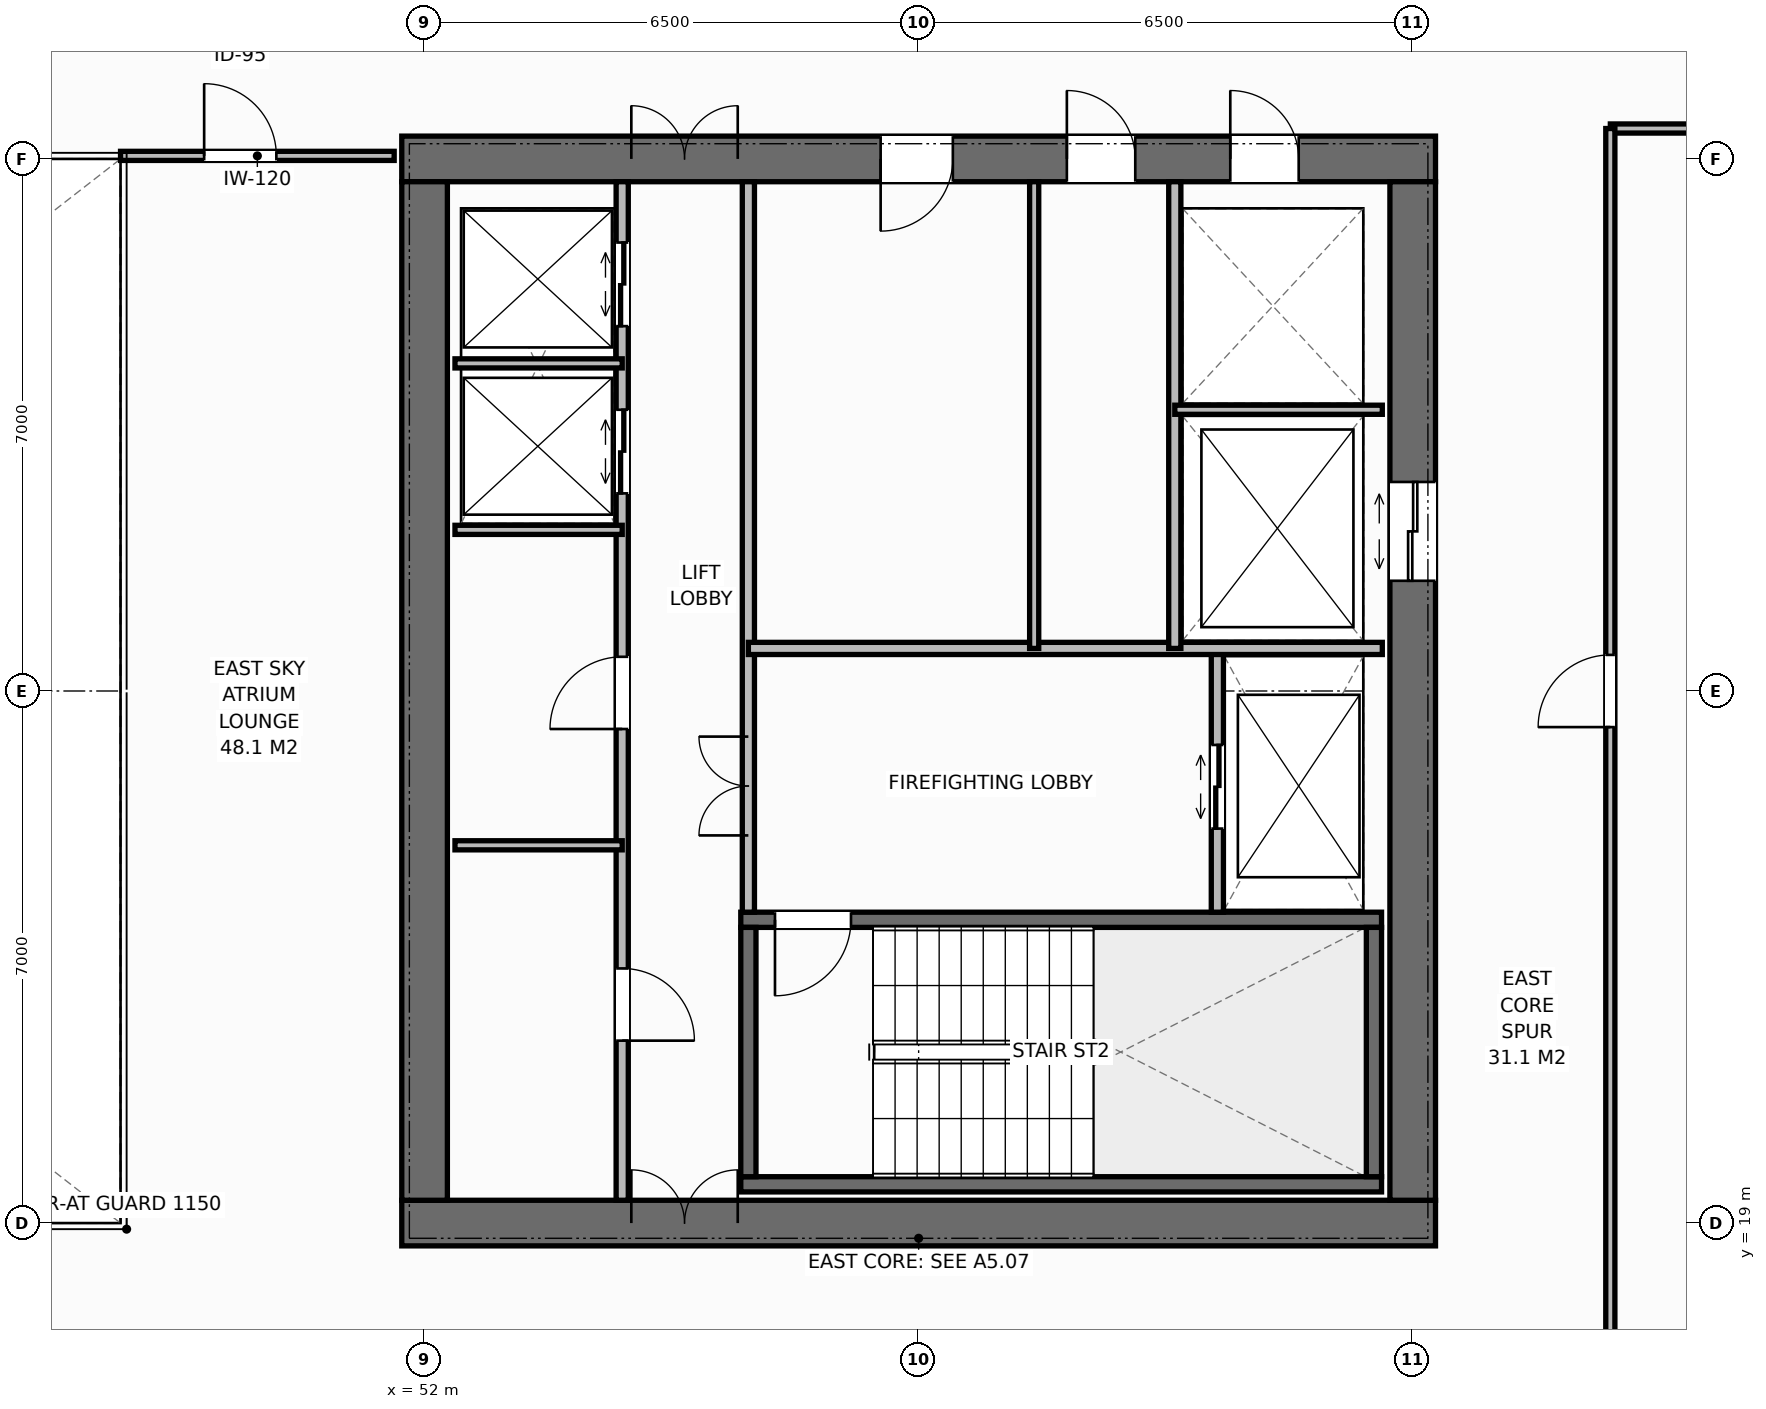
"""IFC4 building model, lengths in metres.
Left out: names, types, materials, properties, quantities, classifications, styles, units other than length and angle.
Written with IfcOpenShell. Run it as: python <this file> out.ifc"""

import sys

from ifc_helpers import new_model, si_unit, direction, frame, frame_2d, origin, place, context, subcontext, project, spatial, rectangle, extrude, element, fill, save


model = new_model("IFC4")
c1 = context("Model", 3, precision=1e-05, world=origin(), true_north=direction((0.0, 1.0)))
c2 = subcontext(c1, "Body", "Model", "MODEL_VIEW")
j1 = project(units=[si_unit("LENGTHUNIT", "METRE"), si_unit("PLANEANGLEUNIT", "RADIAN")], contexts=[c1])
p1 = place(None, origin())
s1 = spatial("IfcSite", under=j1, at=p1, CompositionType="ELEMENT")
p2 = place(p1, origin())
s2 = spatial("IfcBuilding", under=s1, at=p2, CompositionType="ELEMENT")
p3 = place(p2, frame((0.0, 0.0, 186.0)))
s3 = spatial("IfcBuildingStorey", under=s2, at=p3, CompositionType="ELEMENT", Elevation=186.0)
p4 = place(p3, frame((51.7, 19.0, 0.0), z_axis=(0.0, 0.0, 1.0), x_axis=(1.0, 0.0, 0.0)))
e1 = element("IfcWall", 1, at=p4, inside=s3, PredefinedType="SHEAR", context=c2, shape_type="SweptSolid", body=[
    extrude(rectangle(XDim=13.6, YDim=0.6, at=frame_2d((6.8, 0.0))), origin(), (0.0, 0.0, 1.0), 3.8),
])
p5 = place(p4, frame((3.02, 0.0, 0.0)))
e2 = element("IfcOpeningElement", 2, at=p5, cuts=e1, PredefinedType="OPENING", context=c2, shape_type="SweptSolid", body=[
    extrude(rectangle(XDim=1.4, YDim=2.2, at=frame_2d((0.7, 1.1))), frame((0.0, 0.31, 0.0), z_axis=(0.0, -1.0, 0.0), x_axis=(1.0, 0.0, 0.0)), (0.0, 0.0, 1.0), 0.62),
])
p6 = place(p3, frame((51.7, 33.0, 0.0), z_axis=(0.0, 0.0, 1.0), x_axis=(1.0, 0.0, 0.0)))
e3 = element("IfcWall", 3, at=p6, inside=s3, PredefinedType="SHEAR", context=c2, shape_type="SweptSolid", body=[
    extrude(rectangle(XDim=13.6, YDim=0.6, at=frame_2d((6.8, 0.0))), origin(), (0.0, 0.0, 1.0), 3.8),
])
p7 = place(p6, frame((3.02, 0.0, 0.0)))
e4 = element("IfcOpeningElement", 4, at=p7, cuts=e3, PredefinedType="OPENING", context=c2, shape_type="SweptSolid", body=[
    extrude(rectangle(XDim=1.4, YDim=2.2, at=frame_2d((0.7, 1.1))), frame((0.0, 0.31, 0.0), z_axis=(0.0, -1.0, 0.0), x_axis=(1.0, 0.0, 0.0)), (0.0, 0.0, 1.0), 0.62),
])
p8 = place(p6, frame((10.9, 0.0, 0.0)))
e5 = element("IfcOpeningElement", 5, at=p8, cuts=e3, PredefinedType="OPENING", context=c2, shape_type="SweptSolid", body=[
    extrude(rectangle(XDim=0.9, YDim=2.15, at=frame_2d((0.45, 1.075))), frame((0.0, 0.31, 0.0), z_axis=(0.0, -1.0, 0.0), x_axis=(1.0, 0.0, 0.0)), (0.0, 0.0, 1.0), 0.62),
])
p9 = place(p6, frame((6.3, 0.0, 0.0)))
e6 = element("IfcOpeningElement", 6, at=p9, cuts=e3, PredefinedType="OPENING", context=c2, shape_type="SweptSolid", body=[
    extrude(rectangle(XDim=0.95, YDim=2.15, at=frame_2d((0.475, 1.075))), frame((0.0, 0.31, 0.0), z_axis=(0.0, -1.0, 0.0), x_axis=(1.0, 0.0, 0.0)), (0.0, 0.0, 1.0), 0.62),
])
p10 = place(p6, frame((8.75, 0.0, 0.0)))
e7 = element("IfcOpeningElement", 7, at=p10, cuts=e3, PredefinedType="OPENING", context=c2, shape_type="SweptSolid", body=[
    extrude(rectangle(XDim=0.9, YDim=2.15, at=frame_2d((0.45, 1.075))), frame((0.0, 0.31, 0.0), z_axis=(0.0, -1.0, 0.0), x_axis=(1.0, 0.0, 0.0)), (0.0, 0.0, 1.0), 0.62),
])
p11 = place(p3, frame((52.0, 19.3, 0.0), z_axis=(0.0, 0.0, 1.0), x_axis=(0.0, 1.0, 0.0)))
e8 = element("IfcWall", 8, at=p11, inside=s3, PredefinedType="SHEAR", context=c2, shape_type="SweptSolid", body=[
    extrude(rectangle(XDim=13.4, YDim=0.6, at=frame_2d((6.7, 0.0))), origin(), (0.0, 0.0, 1.0), 3.8),
])
p12 = place(p3, frame((65.0, 19.3, 0.0), z_axis=(0.0, 0.0, 1.0), x_axis=(0.0, 1.0, 0.0)))
e9 = element("IfcWall", 9, at=p12, inside=s3, PredefinedType="SHEAR", context=c2, shape_type="SweptSolid", body=[
    extrude(rectangle(XDim=13.4, YDim=0.6, at=frame_2d((6.7, 0.0))), origin(), (0.0, 0.0, 1.0), 3.8),
])
p13 = place(p12, frame((8.15, 0.0, 0.0)))
e10 = element("IfcOpeningElement", 10, at=p13, cuts=e9, PredefinedType="OPENING", context=c2, shape_type="SweptSolid", body=[
    extrude(rectangle(XDim=1.3, YDim=2.2, at=frame_2d((0.65, 1.1))), frame((0.0, 0.31, 0.0), z_axis=(0.0, -1.0, 0.0), x_axis=(1.0, 0.0, 0.0)), (0.0, 0.0, 1.0), 0.62),
])
p14 = place(p3, frame((56.16, 19.51, 0.0), z_axis=(0.0, 0.0, 1.0), x_axis=(1.0, 0.0, 0.0)))
e11 = element("IfcWall", 11, at=p14, inside=s3, PredefinedType="SHEAR", context=c2, shape_type="SweptSolid", body=[
    extrude(rectangle(XDim=8.43, YDim=0.2, at=frame_2d((4.215, 0.0))), origin(), (0.0, 0.0, 1.0), 3.8),
])
p15 = place(p3, frame((56.16, 22.99, 0.0), z_axis=(0.0, 0.0, 1.0), x_axis=(1.0, 0.0, 0.0)))
e12 = element("IfcWall", 12, at=p15, inside=s3, PredefinedType="SHEAR", context=c2, shape_type="SweptSolid", body=[
    extrude(rectangle(XDim=8.43, YDim=0.2, at=frame_2d((4.215, 0.0))), origin(), (0.0, 0.0, 1.0), 3.8),
])
p16 = place(p15, frame((0.45, 0.0, 0.0)))
e13 = element("IfcOpeningElement", 13, at=p16, cuts=e12, PredefinedType="OPENING", context=c2, shape_type="SweptSolid", body=[
    extrude(rectangle(XDim=1.0, YDim=2.15, at=frame_2d((0.5, 1.075))), frame((0.0, 0.11, 0.0), z_axis=(0.0, -1.0, 0.0), x_axis=(1.0, 0.0, 0.0)), (0.0, 0.0, 1.0), 0.22),
])
for number, where, z_axis, x_axis in (
    (14, (56.26, 19.61, 0.0), (0.0, 0.0, 1.0), (0.0, 1.0, 0.0)),
    (15, (64.49, 19.61, 0.0), (0.0, 0.0, 1.0), (0.0, 1.0, 0.0)),
):
    element("IfcWall", number, at=place(p3, frame(where, z_axis=z_axis, x_axis=x_axis)), inside=s3, PredefinedType="SHEAR", context=c2, shape_type="SweptSolid", body=[
        extrude(rectangle(XDim=3.28, YDim=0.2, at=frame_2d((1.64, 0.0))), origin(), (0.0, 0.0, 1.0), 3.8),
    ])
p17 = place(p3, frame((54.6, 19.3, 0.0), z_axis=(0.0, 0.0, 1.0), x_axis=(0.0, 1.0, 0.0)))
e16 = element("IfcWall", 16, at=p17, inside=s3, PredefinedType="STANDARD", context=c2, shape_type="SweptSolid", body=[
    extrude(rectangle(XDim=13.4, YDim=0.16, at=frame_2d((6.7, 0.0))), origin(), (0.0, 0.0, 1.0), 3.572),
])
p18 = place(p17, frame((2.1, 0.0, 0.0)))
e17 = element("IfcOpeningElement", 17, at=p18, cuts=e16, PredefinedType="OPENING", context=c2, shape_type="SweptSolid", body=[
    extrude(rectangle(XDim=0.95, YDim=2.15, at=frame_2d((0.475, 1.075))), frame((0.0, 0.09, 0.0), z_axis=(0.0, -1.0, 0.0), x_axis=(1.0, 0.0, 0.0)), (0.0, 0.0, 1.0), 0.18),
])
p19 = place(p17, frame((6.2, 0.0, 0.0)))
e18 = element("IfcOpeningElement", 18, at=p19, cuts=e16, PredefinedType="OPENING", context=c2, shape_type="SweptSolid", body=[
    extrude(rectangle(XDim=0.95, YDim=2.15, at=frame_2d((0.475, 1.075))), frame((0.0, 0.09, 0.0), z_axis=(0.0, -1.0, 0.0), x_axis=(1.0, 0.0, 0.0)), (0.0, 0.0, 1.0), 0.18),
])
p20 = place(p17, frame((9.3, 0.0, 0.0)))
e19 = element("IfcOpeningElement", 19, at=p20, cuts=e16, PredefinedType="OPENING", context=c2, shape_type="SweptSolid", body=[
    extrude(rectangle(XDim=1.1, YDim=2.2, at=frame_2d((0.55, 1.1))), frame((0.0, 0.09, 0.0), z_axis=(0.0, -1.0, 0.0), x_axis=(1.0, 0.0, 0.0)), (0.0, 0.0, 1.0), 0.18),
])
p21 = place(p17, frame((11.5, 0.0, 0.0)))
e20 = element("IfcOpeningElement", 20, at=p21, cuts=e16, PredefinedType="OPENING", context=c2, shape_type="SweptSolid", body=[
    extrude(rectangle(XDim=1.1, YDim=2.2, at=frame_2d((0.55, 1.1))), frame((0.0, 0.09, 0.0), z_axis=(0.0, -1.0, 0.0), x_axis=(1.0, 0.0, 0.0)), (0.0, 0.0, 1.0), 0.18),
])
p22 = place(p3, frame((56.26, 23.09, 0.0), z_axis=(0.0, 0.0, 1.0), x_axis=(0.0, 1.0, 0.0)))
e21 = element("IfcWall", 21, at=p22, inside=s3, PredefinedType="STANDARD", context=c2, shape_type="SweptSolid", body=[
    extrude(rectangle(XDim=9.61, YDim=0.16, at=frame_2d((4.805, 0.0))), origin(), (0.0, 0.0, 1.0), 3.572),
])
p23 = place(p22, frame((1.01, 0.0, 0.0)))
e22 = element("IfcOpeningElement", 22, at=p23, cuts=e21, PredefinedType="OPENING", context=c2, shape_type="SweptSolid", body=[
    extrude(rectangle(XDim=1.3, YDim=2.2, at=frame_2d((0.65, 1.1))), frame((0.0, 0.09, 0.0), z_axis=(0.0, -1.0, 0.0), x_axis=(1.0, 0.0, 0.0)), (0.0, 0.0, 1.0), 0.18),
])
for number, where, z_axis, x_axis in (
    (23, (52.4, 23.97, 0.0), (0.0, 0.0, 1.0), (1.0, 0.0, 0.0)),
    (24, (52.4, 28.12, 0.0), (0.0, 0.0, 1.0), (1.0, 0.0, 0.0)),
    (25, (52.4, 30.31, 0.0), (0.0, 0.0, 1.0), (1.0, 0.0, 0.0)),
):
    element("IfcWall", number, at=place(p3, frame(where, z_axis=z_axis, x_axis=x_axis)), inside=s3, PredefinedType="PARTITIONING", context=c2, shape_type="SweptSolid", body=[
        extrude(rectangle(XDim=2.2, YDim=0.12, at=frame_2d((1.1, 0.0))), origin(), (0.0, 0.0, 1.0), 3.572),
    ])
p24 = place(p3, frame((62.43, 23.09, 0.0), z_axis=(0.0, 0.0, 1.0), x_axis=(0.0, 1.0, 0.0)))
e26 = element("IfcWall", 26, at=p24, inside=s3, PredefinedType="STANDARD", context=c2, shape_type="SweptSolid", body=[
    extrude(rectangle(XDim=3.47, YDim=0.16, at=frame_2d((1.735, 0.0))), origin(), (0.0, 0.0, 1.0), 3.572),
])
p25 = place(p24, frame((1.1, 0.0, 0.0)))
e27 = element("IfcOpeningElement", 27, at=p25, cuts=e26, PredefinedType="OPENING", context=c2, shape_type="SweptSolid", body=[
    extrude(rectangle(XDim=1.1, YDim=2.2, at=frame_2d((0.55, 1.1))), frame((0.0, 0.09, 0.0), z_axis=(0.0, -1.0, 0.0), x_axis=(1.0, 0.0, 0.0)), (0.0, 0.0, 1.0), 0.18),
])
p26 = place(p3, frame((56.26, 26.56, 0.0), z_axis=(0.0, 0.0, 1.0), x_axis=(1.0, 0.0, 0.0)))
e28 = element("IfcWall", 28, at=p26, inside=s3, PredefinedType="STANDARD", context=c2, shape_type="SweptSolid", body=[
    extrude(rectangle(XDim=8.34, YDim=0.16, at=frame_2d((4.17, 0.0))), origin(), (0.0, 0.0, 1.0), 3.572),
])
p27 = place(p3, frame((61.87, 26.56, 0.0), z_axis=(0.0, 0.0, 1.0), x_axis=(0.0, 1.0, 0.0)))
e29 = element("IfcWall", 29, at=p27, inside=s3, PredefinedType="STANDARD", context=c2, shape_type="SweptSolid", body=[
    extrude(rectangle(XDim=6.14, YDim=0.16, at=frame_2d((3.07, 0.0))), origin(), (0.0, 0.0, 1.0), 3.572),
])
p28 = place(p3, frame((61.87, 29.7, 0.0), z_axis=(0.0, 0.0, 1.0), x_axis=(1.0, 0.0, 0.0)))
e30 = element("IfcWall", 30, at=p28, inside=s3, PredefinedType="PARTITIONING", context=c2, shape_type="SweptSolid", body=[
    extrude(rectangle(XDim=2.73, YDim=0.12, at=frame_2d((1.365, 0.0))), origin(), (0.0, 0.0, 1.0), 3.572),
])
p29 = place(p3, frame((60.02, 26.56, 0.0), z_axis=(0.0, 0.0, 1.0), x_axis=(0.0, 1.0, 0.0)))
e31 = element("IfcWall", 31, at=p29, inside=s3, PredefinedType="PARTITIONING", context=c2, shape_type="SweptSolid", body=[
    extrude(rectangle(XDim=6.14, YDim=0.12, at=frame_2d((3.07, 0.0))), origin(), (0.0, 0.0, 1.0), 3.572),
])
p30 = place(p3, frame((48.0, 33.04, 0.0), z_axis=(0.0, 0.0, 1.0), x_axis=(1.0, 0.0, 0.0)))
e32 = element("IfcWall", 32, at=p30, inside=s3, PredefinedType="PARTITIONING", context=c2, shape_type="SweptSolid", body=[
    extrude(rectangle(XDim=3.6, YDim=0.12, at=frame_2d((1.8, 0.0))), origin(), (0.0, 0.0, 1.0), 3.312),
])
p31 = place(p30, frame((1.1, 0.0, 0.0)))
e33 = element("IfcOpeningElement", 33, at=p31, cuts=e32, PredefinedType="OPENING", context=c2, shape_type="SweptSolid", body=[
    extrude(rectangle(XDim=0.95, YDim=2.15, at=frame_2d((0.475, 1.075))), frame((0.0, 0.07, 0.0), z_axis=(0.0, -1.0, 0.0), x_axis=(1.0, 0.0, 0.0)), (0.0, 0.0, 1.0), 0.14),
])
p32 = place(p3, frame((67.6, 33.4, 0.0), z_axis=(0.0, 0.0, 1.0), x_axis=(1.0, 0.0, 0.0)))
e34 = element("IfcWall", 34, at=p32, inside=s3, PredefinedType="PARTITIONING", context=c2, shape_type="SweptSolid", body=[
    extrude(rectangle(XDim=6.58, YDim=0.12, at=frame_2d((3.29, 0.0))), origin(), (0.0, 0.0, 1.0), 3.572),
])
p33 = place(p3, frame((67.6, 16.5, 0.0), z_axis=(0.0, 0.0, 1.0), x_axis=(0.0, 1.0, 0.0)))
e35 = element("IfcWall", 35, at=p33, inside=s3, PredefinedType="PARTITIONING", context=c2, shape_type="SweptSolid", body=[
    extrude(rectangle(XDim=16.9, YDim=0.12, at=frame_2d((8.45, 0.0))), origin(), (0.0, 0.0, 1.0), 3.572),
])
p34 = place(p33, frame((9.025, 0.0, 0.0)))
e36 = element("IfcOpeningElement", 36, at=p34, cuts=e35, PredefinedType="OPENING", context=c2, shape_type="SweptSolid", body=[
    extrude(rectangle(XDim=0.95, YDim=2.15, at=frame_2d((0.475, 1.075))), frame((0.0, 0.07, 0.0), z_axis=(0.0, -1.0, 0.0), x_axis=(1.0, 0.0, 0.0)), (0.0, 0.0, 1.0), 0.14),
])
p35 = place(p5, origin())
e37 = element("IfcDoor", 37, at=p35, inside=s3, OperationType="DOUBLE_DOOR_SINGLE_SWING", PredefinedType="DOOR", context=c2, shape_type="SweptSolid", body=[
    extrude(rectangle(XDim=1.4, YDim=2.2, at=frame_2d((0.7, 1.1))), frame((0.0, 0.075, 0.0), z_axis=(0.0, -1.0, 0.0), x_axis=(1.0, 0.0, 0.0)), (0.0, 0.0, 1.0), 0.05),
])
fill(e2, e37)
p36 = place(p7, origin())
e38 = element("IfcDoor", 38, at=p36, inside=s3, OperationType="DOUBLE_DOOR_SINGLE_SWING", PredefinedType="DOOR", context=c2, shape_type="SweptSolid", body=[
    extrude(rectangle(XDim=1.4, YDim=2.2, at=frame_2d((0.7, 1.1))), frame((0.0, -0.025, 0.0), z_axis=(0.0, -1.0, 0.0), x_axis=(1.0, 0.0, 0.0)), (0.0, 0.0, 1.0), 0.05),
])
fill(e4, e38)
p37 = place(p18, origin())
e39 = element("IfcDoor", 39, at=p37, inside=s3, OperationType="SINGLE_SWING_RIGHT", PredefinedType="DOOR", context=c2, shape_type="SweptSolid", body=[
    extrude(rectangle(XDim=0.95, YDim=2.15, at=frame_2d((0.475, 1.075))), frame((0.0, 0.025, 0.0), z_axis=(0.0, -1.0, 0.0), x_axis=(1.0, 0.0, 0.0)), (0.0, 0.0, 1.0), 0.05),
])
fill(e17, e39)
p38 = place(p19, origin())
e40 = element("IfcDoor", 40, at=p38, inside=s3, OperationType="SINGLE_SWING_LEFT", PredefinedType="DOOR", context=c2, shape_type="SweptSolid", body=[
    extrude(rectangle(XDim=0.95, YDim=2.15, at=frame_2d((0.475, 1.075))), frame((0.0, 0.025, 0.0), z_axis=(0.0, -1.0, 0.0), x_axis=(1.0, 0.0, 0.0)), (0.0, 0.0, 1.0), 0.05),
])
fill(e18, e40)
p39 = place(p20, origin())
e41 = element("IfcDoor", 41, at=p39, inside=s3, OperationType="DOUBLE_DOOR_SLIDING", PredefinedType="DOOR", context=c2, shape_type="SweptSolid", body=[
    extrude(rectangle(XDim=1.1, YDim=2.2, at=frame_2d((0.55, 1.1))), frame((0.0, 0.025, 0.0), z_axis=(0.0, -1.0, 0.0), x_axis=(1.0, 0.0, 0.0)), (0.0, 0.0, 1.0), 0.05),
])
fill(e19, e41)
p40 = place(p21, origin())
e42 = element("IfcDoor", 42, at=p40, inside=s3, OperationType="DOUBLE_DOOR_SLIDING", PredefinedType="DOOR", context=c2, shape_type="SweptSolid", body=[
    extrude(rectangle(XDim=1.1, YDim=2.2, at=frame_2d((0.55, 1.1))), frame((0.0, 0.025, 0.0), z_axis=(0.0, -1.0, 0.0), x_axis=(1.0, 0.0, 0.0)), (0.0, 0.0, 1.0), 0.05),
])
fill(e20, e42)
p41 = place(p16, origin())
e43 = element("IfcDoor", 43, at=p41, inside=s3, OperationType="SINGLE_SWING_RIGHT", PredefinedType="DOOR", context=c2, shape_type="SweptSolid", body=[
    extrude(rectangle(XDim=1.0, YDim=2.15, at=frame_2d((0.5, 1.075))), frame((0.0, 0.025, 0.0), z_axis=(0.0, -1.0, 0.0), x_axis=(1.0, 0.0, 0.0)), (0.0, 0.0, 1.0), 0.05),
])
fill(e13, e43)
p42 = place(p25, origin())
e44 = element("IfcDoor", 44, at=p42, inside=s3, OperationType="DOUBLE_DOOR_SLIDING", PredefinedType="DOOR", context=c2, shape_type="SweptSolid", body=[
    extrude(rectangle(XDim=1.1, YDim=2.2, at=frame_2d((0.55, 1.1))), frame((0.0, 0.025, 0.0), z_axis=(0.0, -1.0, 0.0), x_axis=(1.0, 0.0, 0.0)), (0.0, 0.0, 1.0), 0.05),
])
fill(e27, e44)
p43 = place(p23, origin())
e45 = element("IfcDoor", 45, at=p43, inside=s3, OperationType="DOUBLE_DOOR_SINGLE_SWING", PredefinedType="DOOR", context=c2, shape_type="SweptSolid", body=[
    extrude(rectangle(XDim=1.3, YDim=2.2, at=frame_2d((0.65, 1.1))), frame((0.0, 0.025, 0.0), z_axis=(0.0, -1.0, 0.0), x_axis=(1.0, 0.0, 0.0)), (0.0, 0.0, 1.0), 0.05),
])
fill(e22, e45)
p44 = place(p13, origin())
e46 = element("IfcDoor", 46, at=p44, inside=s3, OperationType="DOUBLE_DOOR_SLIDING", PredefinedType="DOOR", context=c2, shape_type="SweptSolid", body=[
    extrude(rectangle(XDim=1.3, YDim=2.2, at=frame_2d((0.65, 1.1))), frame((0.0, 0.025, 0.0), z_axis=(0.0, -1.0, 0.0), x_axis=(1.0, 0.0, 0.0)), (0.0, 0.0, 1.0), 0.05),
])
fill(e10, e46)
p45 = place(p8, origin())
e47 = element("IfcDoor", 47, at=p45, inside=s3, OperationType="SINGLE_SWING_LEFT", PredefinedType="DOOR", context=c2, shape_type="SweptSolid", body=[
    extrude(rectangle(XDim=0.9, YDim=2.15, at=frame_2d((0.45, 1.075))), frame((0.0, -0.025, 0.0), z_axis=(0.0, -1.0, 0.0), x_axis=(1.0, 0.0, 0.0)), (0.0, 0.0, 1.0), 0.05),
])
fill(e5, e47)
p46 = place(p9, origin())
e48 = element("IfcDoor", 48, at=p46, inside=s3, OperationType="SINGLE_SWING_RIGHT", PredefinedType="DOOR", context=c2, shape_type="SweptSolid", body=[
    extrude(rectangle(XDim=0.95, YDim=2.15, at=frame_2d((0.475, 1.075))), frame((0.0, -0.025, 0.0), z_axis=(0.0, -1.0, 0.0), x_axis=(1.0, 0.0, 0.0)), (0.0, 0.0, 1.0), 0.05),
])
fill(e6, e48)
p47 = place(p10, origin())
e49 = element("IfcDoor", 49, at=p47, inside=s3, OperationType="SINGLE_SWING_LEFT", PredefinedType="DOOR", context=c2, shape_type="SweptSolid", body=[
    extrude(rectangle(XDim=0.9, YDim=2.15, at=frame_2d((0.45, 1.075))), frame((0.0, -0.025, 0.0), z_axis=(0.0, -1.0, 0.0), x_axis=(1.0, 0.0, 0.0)), (0.0, 0.0, 1.0), 0.05),
])
fill(e7, e49)
p48 = place(p31, origin())
e50 = element("IfcDoor", 50, at=p48, inside=s3, OperationType="SINGLE_SWING_LEFT", PredefinedType="DOOR", context=c2, shape_type="SweptSolid", body=[
    extrude(rectangle(XDim=0.95, YDim=2.15, at=frame_2d((0.475, 1.075))), frame((0.0, 0.025, 0.0), z_axis=(0.0, -1.0, 0.0), x_axis=(1.0, 0.0, 0.0)), (0.0, 0.0, 1.0), 0.05),
])
fill(e33, e50)
p49 = place(p34, origin())
e51 = element("IfcDoor", 51, at=p49, inside=s3, OperationType="SINGLE_SWING_LEFT", PredefinedType="DOOR", context=c2, shape_type="SweptSolid", body=[
    extrude(rectangle(XDim=0.95, YDim=2.15, at=frame_2d((0.475, 1.075))), frame((0.0, 0.025, 0.0), z_axis=(0.0, -1.0, 0.0), x_axis=(1.0, 0.0, 0.0)), (0.0, 0.0, 1.0), 0.05),
])
fill(e36, e51)
save(model, sys.argv[1])
